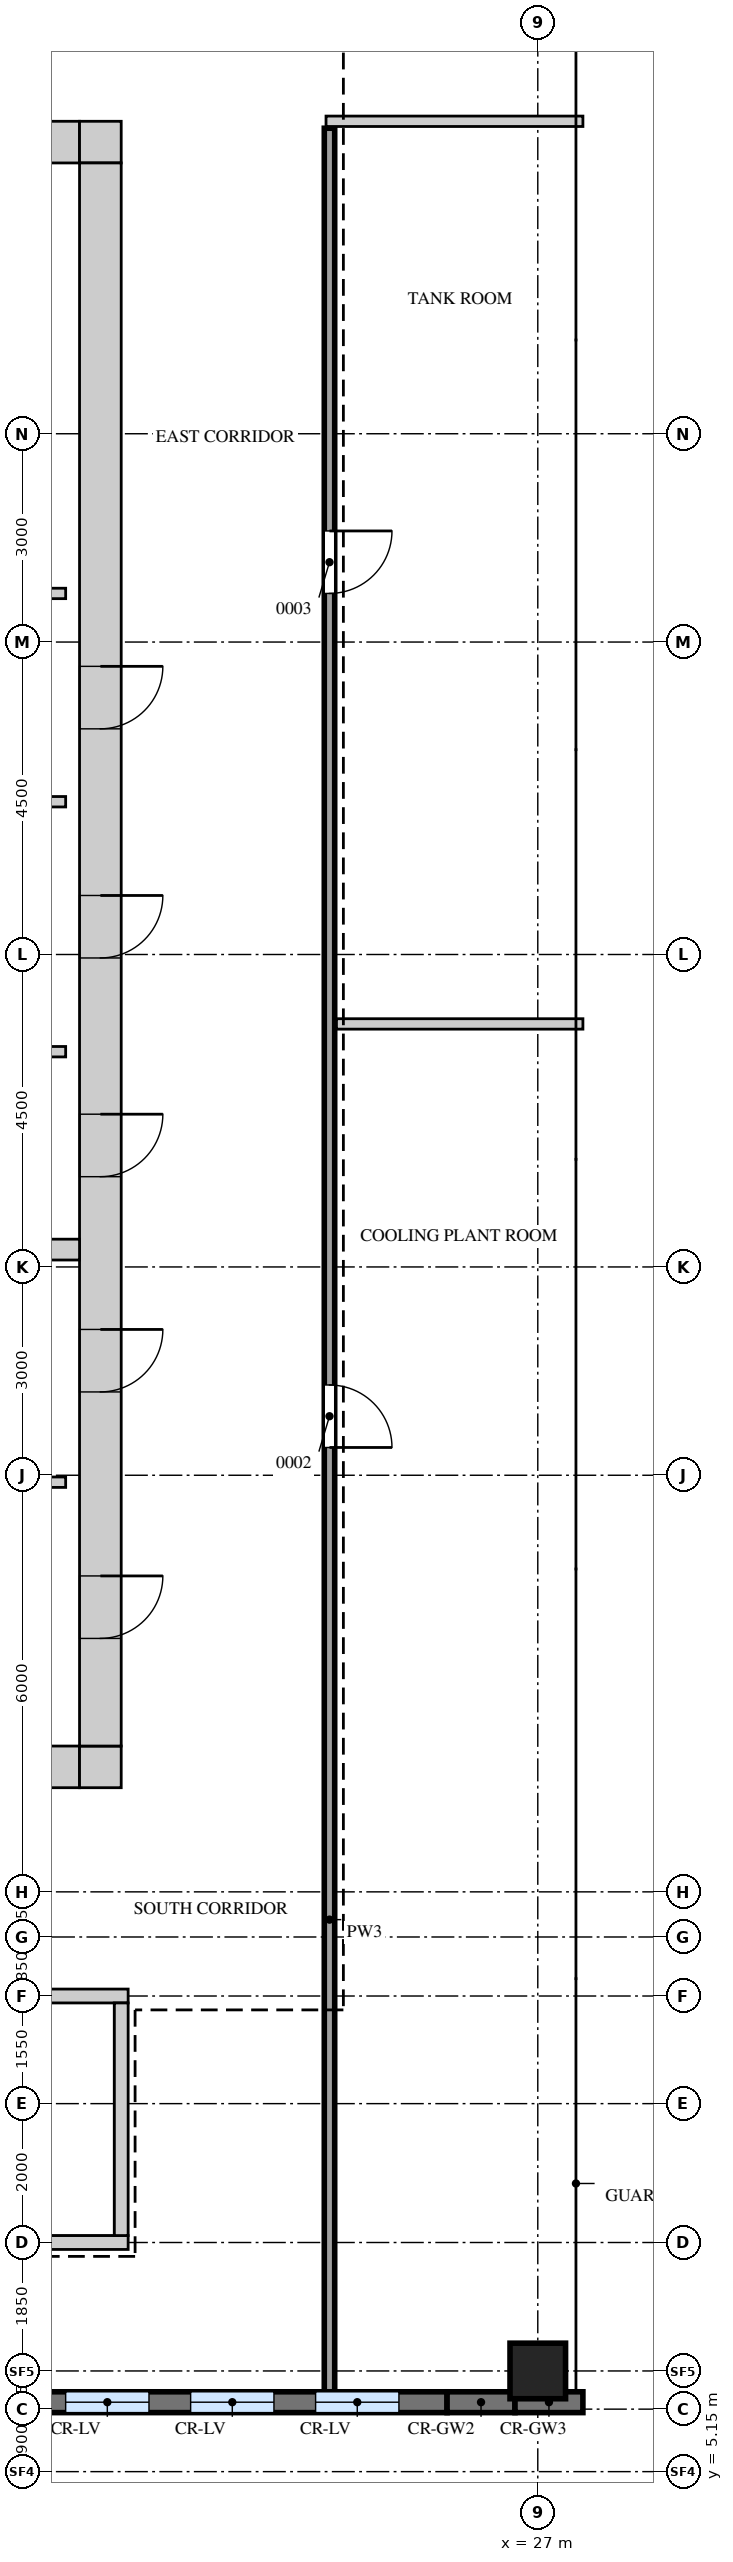
"""IFC4 building model, lengths in metres.
Left out: names, types, materials, properties, quantities, classifications, styles, units other than length and angle.
Written with IfcOpenShell. Run it as: python <this file> out.ifc"""

import sys

from ifc_helpers import new_model, si_unit, direction, frame, frame_2d, origin, origin_2d, place, context, subcontext, project, spatial, rectangle, extrude, source, transform, mapped, element, fill, save


model = new_model("IFC4")
c1 = context("Model", 3, precision=1e-05, world=origin(), true_north=direction((0.0, 1.0)))
c2 = subcontext(c1, "Body", "Model", "MODEL_VIEW")
j1 = project(units=[si_unit("LENGTHUNIT", "METRE"), si_unit("PLANEANGLEUNIT", "RADIAN")], contexts=[c1])
p1 = place(None, origin())
s1 = spatial("IfcSite", under=j1, at=p1, CompositionType="ELEMENT")
p2 = place(p1, origin())
s2 = spatial("IfcBuilding", under=s1, at=p2, CompositionType="ELEMENT")
p3 = place(p2, frame((0.0, 0.0, 348.2)))
s3 = spatial("IfcBuildingStorey", under=s2, at=p3, CompositionType="ELEMENT", Elevation=348.2)
m1 = source(origin(), c2, "Body", "SweptSolid", [
    extrude(rectangle(XDim=14.4, YDim=0.6, at=frame_2d((7.2, 0.0))), origin(), (0.0, 0.0, 1.0), 4.25),
])
p4 = place(p3, frame((6.0, 38.7, 0.0), z_axis=(0.0, 0.0, 1.0), x_axis=(1.0, 0.0, 0.0)))
e1 = element("IfcWall", 1, at=p4, inside=s3, PredefinedType="SHEAR", context=c2, shape_type="MappedRepresentation", body=[
    mapped(m1, transform((0.0, 0.0, 0.0))),
])
m2 = source(origin(), c2, "Body", "SweptSolid", [
    extrude(rectangle(XDim=0.9, YDim=2.1, at=frame_2d((0.45, 1.05))), frame((0.0, 0.31, 0.0), z_axis=(0.0, -1.0, 0.0), x_axis=(1.0, 0.0, 0.0)), (0.0, 0.0, 1.0), 0.62),
])
p5 = place(p4, frame((3.7, 0.0, 0.0)))
e2 = element("IfcOpeningElement", 2, at=p5, cuts=e1, PredefinedType="OPENING", context=c2, shape_type="MappedRepresentation", body=[
    mapped(m2, transform((0.0, 0.0, 0.0))),
])
p6 = place(p4, frame((10.4, 0.0, 0.0)))
e3 = element("IfcOpeningElement", 3, at=p6, cuts=e1, PredefinedType="OPENING", context=c2, shape_type="MappedRepresentation", body=[
    mapped(m2, transform((0.0, 0.0, 0.0))),
])
m3 = source(origin(), c2, "Body", "SweptSolid", [
    extrude(rectangle(XDim=0.6, YDim=0.6, at=frame_2d((0.3, 0.0))), origin(), (0.0, 0.0, 1.0), 4.25),
])
p7 = place(p3, frame((20.4, 38.7, 0.0), z_axis=(0.0, 0.0, 1.0), x_axis=(1.0, 0.0, 0.0)))
e4 = element("IfcWall", 4, at=p7, inside=s3, PredefinedType="SHEAR", context=c2, shape_type="MappedRepresentation", body=[
    mapped(m3, transform((0.0, 0.0, 0.0))),
])
p8 = place(p3, frame((6.0, 15.3, 0.0), z_axis=(0.0, 0.0, 1.0), x_axis=(1.0, 0.0, 0.0)))
e5 = element("IfcWall", 5, at=p8, inside=s3, PredefinedType="SHEAR", context=c2, shape_type="MappedRepresentation", body=[
    mapped(m1, transform((0.0, 0.0, 0.0))),
])
m4 = source(origin(), c2, "Body", "SweptSolid", [
    extrude(rectangle(XDim=1.2, YDim=2.1, at=frame_2d((0.6, 1.05))), frame((0.0, 0.31, 0.0), z_axis=(0.0, -1.0, 0.0), x_axis=(1.0, 0.0, 0.0)), (0.0, 0.0, 1.0), 0.62),
])
p9 = place(p8, frame((6.2, 0.0, 0.0)))
e6 = element("IfcOpeningElement", 6, at=p9, cuts=e5, PredefinedType="OPENING", context=c2, shape_type="MappedRepresentation", body=[
    mapped(m4, transform((0.0, 0.0, 0.0))),
])
p10 = place(p8, frame((2.85, 0.0, 0.0)))
e7 = element("IfcOpeningElement", 7, at=p10, cuts=e5, PredefinedType="OPENING", context=c2, shape_type="MappedRepresentation", body=[
    mapped(m4, transform((0.0, 0.0, 0.0))),
])
m5 = source(origin(), c2, "Body", "SweptSolid", [
    extrude(rectangle(XDim=1.0, YDim=2.1, at=frame_2d((0.5, 1.05))), frame((0.0, 0.31, 0.0), z_axis=(0.0, -1.0, 0.0), x_axis=(1.0, 0.0, 0.0)), (0.0, 0.0, 1.0), 0.62),
])
p11 = place(p8, frame((8.7, 0.0, 0.0)))
e8 = element("IfcOpeningElement", 8, at=p11, cuts=e5, PredefinedType="OPENING", context=c2, shape_type="MappedRepresentation", body=[
    mapped(m5, transform((0.0, 0.0, 0.0))),
])
p12 = place(p3, frame((20.4, 15.3, 0.0), z_axis=(0.0, 0.0, 1.0), x_axis=(1.0, 0.0, 0.0)))
e9 = element("IfcWall", 9, at=p12, inside=s3, PredefinedType="SHEAR", context=c2, shape_type="MappedRepresentation", body=[
    mapped(m3, transform((0.0, 0.0, 0.0))),
])
m6 = source(origin(), c2, "Body", "SweptSolid", [
    extrude(rectangle(XDim=22.8, YDim=0.6, at=frame_2d((11.4, 0.0))), origin(), (0.0, 0.0, 1.0), 4.25),
])
p13 = place(p3, frame((20.7, 15.6, 0.0), z_axis=(0.0, 0.0, 1.0), x_axis=(0.0, 1.0, 0.0)))
e10 = element("IfcWall", 10, at=p13, inside=s3, PredefinedType="SHEAR", context=c2, shape_type="MappedRepresentation", body=[
    mapped(m6, transform((0.0, 0.0, 0.0))),
])
p14 = place(p13, frame((8.2, 0.0, 0.0)))
e11 = element("IfcOpeningElement", 11, at=p14, cuts=e10, PredefinedType="OPENING", context=c2, shape_type="MappedRepresentation", body=[
    mapped(m2, transform((0.0, 0.0, 0.0))),
])
p15 = place(p13, frame((11.35, 0.0, 0.0)))
e12 = element("IfcOpeningElement", 12, at=p15, cuts=e10, PredefinedType="OPENING", context=c2, shape_type="MappedRepresentation", body=[
    mapped(m2, transform((0.0, 0.0, 0.0))),
])
p16 = place(p13, frame((14.65, 0.0, 0.0)))
e13 = element("IfcOpeningElement", 13, at=p16, cuts=e10, PredefinedType="OPENING", context=c2, shape_type="MappedRepresentation", body=[
    mapped(m2, transform((0.0, 0.0, 0.0))),
])
p17 = place(p13, frame((1.55, 0.0, 0.0)))
e14 = element("IfcOpeningElement", 14, at=p17, cuts=e10, PredefinedType="OPENING", context=c2, shape_type="MappedRepresentation", body=[
    mapped(m2, transform((0.0, 0.0, 0.0))),
])
p18 = place(p13, frame((5.1, 0.0, 0.0)))
e15 = element("IfcOpeningElement", 15, at=p18, cuts=e10, PredefinedType="OPENING", context=c2, shape_type="MappedRepresentation", body=[
    mapped(m2, transform((0.0, 0.0, 0.0))),
])
m7 = source(origin(), c2, "Body", "SweptSolid", [
    extrude(rectangle(XDim=7.2, YDim=0.2, at=frame_2d((3.6, 0.0))), origin(), (0.0, 0.0, 1.0), 4.25),
])
p19 = place(p3, frame((13.9, 12.0, 0.0), z_axis=(0.0, 0.0, 1.0), x_axis=(1.0, 0.0, 0.0)))
e16 = element("IfcWall", 16, at=p19, inside=s3, PredefinedType="SHEAR", context=c2, shape_type="MappedRepresentation", body=[
    mapped(m7, transform((0.0, 0.0, 0.0))),
])
p20 = place(p3, frame((13.9, 8.45, 0.0), z_axis=(0.0, 0.0, 1.0), x_axis=(1.0, 0.0, 0.0)))
e17 = element("IfcWall", 17, at=p20, inside=s3, PredefinedType="SHEAR", context=c2, shape_type="MappedRepresentation", body=[
    mapped(m7, transform((0.0, 0.0, 0.0))),
])
m8 = source(origin(), c2, "Body", "SweptSolid", [
    extrude(rectangle(XDim=1.2, YDim=2.1, at=frame_2d((0.6, 1.05))), frame((0.0, 0.11, 0.0), z_axis=(0.0, -1.0, 0.0), x_axis=(1.0, 0.0, 0.0)), (0.0, 0.0, 1.0), 0.22),
])
p21 = place(p20, frame((0.35, 0.0, 0.0)))
e18 = element("IfcOpeningElement", 18, at=p21, cuts=e17, PredefinedType="OPENING", context=c2, shape_type="MappedRepresentation", body=[
    mapped(m8, transform((0.0, 0.0, 0.0))),
])
m9 = source(origin(), c2, "Body", "SweptSolid", [
    extrude(rectangle(XDim=3.35, YDim=0.2, at=frame_2d((1.675, 0.0))), origin(), (0.0, 0.0, 1.0), 4.25),
])
p22 = place(p3, frame((21.0, 8.55, 0.0), z_axis=(0.0, 0.0, 1.0), x_axis=(0.0, 1.0, 0.0)))
e19 = element("IfcWall", 19, at=p22, inside=s3, PredefinedType="SHEAR", context=c2, shape_type="MappedRepresentation", body=[
    mapped(m9, transform((0.0, 0.0, 0.0))),
])
m10 = source(origin(), c2, "Body", "SweptSolid", [
    extrude(rectangle(XDim=13.2, YDim=0.3, at=frame_2d((6.6, 0.0))), origin(), (0.0, 0.0, 1.0), 4.25),
])
p23 = place(p3, frame((7.2, 22.75, 0.0), z_axis=(0.0, 0.0, 1.0), x_axis=(1.0, 0.0, 0.0)))
e20 = element("IfcWall", 20, at=p23, inside=s3, PredefinedType="STANDARD", context=c2, shape_type="MappedRepresentation", body=[
    mapped(m10, transform((0.0, 0.0, 0.0))),
])
m11 = source(origin(), c2, "Body", "SweptSolid", [
    extrude(rectangle(XDim=0.8, YDim=0.8, at=origin_2d()), origin(), (0.0, 0.0, 1.0), 1.802),
])
p24 = place(p3, frame((27.0, 6.6, 0.0), z_axis=(0.0, 0.0, 1.0), x_axis=(1.0, 0.0, 0.0)))
e21 = element("IfcColumn", 21, at=p24, inside=s3, PredefinedType="COLUMN", context=c2, shape_type="MappedRepresentation", body=[
    mapped(m11, transform((0.0, 0.0, 0.0))),
])
m12 = source(origin(), c2, "Body", "SweptSolid", [
    extrude(rectangle(XDim=13.394, YDim=0.3, at=frame_2d((6.697, 0.0))), origin(), (0.0, 0.0, 1.0), 4.5),
])
p25 = place(p3, frame((12.3, 6.15, 0.0), z_axis=(0.0, 0.0, 1.0), x_axis=(1.0, 0.0, 0.0)))
e22 = element("IfcWall", 22, at=p25, inside=s3, PredefinedType="SOLIDWALL", context=c2, shape_type="MappedRepresentation", body=[
    mapped(m12, transform((0.0, 0.0, 0.0))),
])
m13 = source(origin(), c2, "Body", "SweptSolid", [
    extrude(rectangle(XDim=1.2, YDim=2.4, at=frame_2d((0.6, 1.2))), frame((0.0, 0.16, 0.0), z_axis=(0.0, -1.0, 0.0), x_axis=(1.0, 0.0, 0.0)), (0.0, 0.0, 1.0), 0.32),
])
p26 = place(p25, frame((0.7, 0.0, 0.9)))
e23 = element("IfcOpeningElement", 23, at=p26, cuts=e22, PredefinedType="OPENING", context=c2, shape_type="MappedRepresentation", body=[
    mapped(m13, transform((0.0, 0.0, 0.0))),
])
p27 = place(p25, frame((2.5, 0.0, 0.9)))
e24 = element("IfcOpeningElement", 24, at=p27, cuts=e22, PredefinedType="OPENING", context=c2, shape_type="MappedRepresentation", body=[
    mapped(m13, transform((0.0, 0.0, 0.0))),
])
p28 = place(p25, frame((4.3, 0.0, 0.9)))
e25 = element("IfcOpeningElement", 25, at=p28, cuts=e22, PredefinedType="OPENING", context=c2, shape_type="MappedRepresentation", body=[
    mapped(m13, transform((0.0, 0.0, 0.0))),
])
p29 = place(p25, frame((6.1, 0.0, 0.9)))
e26 = element("IfcOpeningElement", 26, at=p29, cuts=e22, PredefinedType="OPENING", context=c2, shape_type="MappedRepresentation", body=[
    mapped(m13, transform((0.0, 0.0, 0.0))),
])
p30 = place(p25, frame((7.9, 0.0, 0.9)))
e27 = element("IfcOpeningElement", 27, at=p30, cuts=e22, PredefinedType="OPENING", context=c2, shape_type="MappedRepresentation", body=[
    mapped(m13, transform((0.0, 0.0, 0.0))),
])
p31 = place(p25, frame((9.7, 0.0, 0.9)))
e28 = element("IfcOpeningElement", 28, at=p31, cuts=e22, PredefinedType="OPENING", context=c2, shape_type="MappedRepresentation", body=[
    mapped(m13, transform((0.0, 0.0, 0.0))),
])
p32 = place(p25, frame((11.5, 0.0, 0.9)))
e29 = element("IfcOpeningElement", 29, at=p32, cuts=e22, PredefinedType="OPENING", context=c2, shape_type="MappedRepresentation", body=[
    mapped(m13, transform((0.0, 0.0, 0.0))),
])
m14 = source(origin(), c2, "Body", "SweptSolid", [
    extrude(rectangle(XDim=0.978, YDim=0.3, at=frame_2d((0.489, 0.0))), origin(), (0.0, 0.0, 1.0), 4.05),
])
p33 = place(p3, frame((25.694, 6.15, 0.0), z_axis=(0.0, 0.0, 1.0), x_axis=(1.0, 0.0, 0.0)))
e30 = element("IfcWall", 30, at=p33, inside=s3, PredefinedType="SOLIDWALL", context=c2, shape_type="MappedRepresentation", body=[
    mapped(m14, transform((0.0, 0.0, 0.0))),
])
m15 = source(origin(), c2, "Body", "SweptSolid", [
    extrude(rectangle(XDim=0.978, YDim=0.3, at=frame_2d((0.489, 0.0))), origin(), (0.0, 0.0, 1.0), 2.3),
])
p34 = place(p3, frame((26.672, 6.15, 0.0), z_axis=(0.0, 0.0, 1.0), x_axis=(1.0, 0.0, 0.0)))
e31 = element("IfcWall", 31, at=p34, inside=s3, PredefinedType="SOLIDWALL", context=c2, shape_type="MappedRepresentation", body=[
    mapped(m15, transform((0.0, 0.0, 0.0))),
])
m16 = source(origin(), c2, "Body", "SweptSolid", [
    extrude(rectangle(XDim=32.6, YDim=0.15, at=frame_2d((16.3, 0.0))), origin(), (0.0, 0.0, 1.0), 4.3),
])
p35 = place(p3, frame((24.0, 6.3, 0.0), z_axis=(0.0, 0.0, 1.0), x_axis=(0.0, 1.0, 0.0)))
e32 = element("IfcWall", 32, at=p35, inside=s3, PredefinedType="PARTITIONING", context=c2, shape_type="MappedRepresentation", body=[
    mapped(m16, transform((0.0, 0.0, 0.0))),
])
m17 = source(origin(), c2, "Body", "SweptSolid", [
    extrude(rectangle(XDim=0.9, YDim=2.1, at=frame_2d((0.45, 1.05))), frame((0.0, 0.085, 0.0), z_axis=(0.0, -1.0, 0.0), x_axis=(1.0, 0.0, 0.0)), (0.0, 0.0, 1.0), 0.17),
])
p36 = place(p35, frame((13.6, 0.0, 0.0)))
e33 = element("IfcOpeningElement", 33, at=p36, cuts=e32, PredefinedType="OPENING", context=c2, shape_type="MappedRepresentation", body=[
    mapped(m17, transform((0.0, 0.0, 0.0))),
])
p37 = place(p35, frame((25.9, 0.0, 0.0)))
e34 = element("IfcOpeningElement", 34, at=p37, cuts=e32, PredefinedType="OPENING", context=c2, shape_type="MappedRepresentation", body=[
    mapped(m17, transform((0.0, 0.0, 0.0))),
])
m18 = source(origin(), c2, "Body", "SweptSolid", [
    extrude(rectangle(XDim=4.1, YDim=0.15, at=frame_2d((2.05, 0.0))), origin(), (0.0, 0.0, 1.0), 4.3),
])
p38 = place(p3, frame((16.1, 19.4, 0.0), z_axis=(0.0, 0.0, 1.0), x_axis=(1.0, 0.0, 0.0)))
e35 = element("IfcWall", 35, at=p38, inside=s3, PredefinedType="PARTITIONING", context=c2, shape_type="MappedRepresentation", body=[
    mapped(m18, transform((0.0, 0.0, 0.0))),
])
m19 = source(origin(), c2, "Body", "SweptSolid", [
    extrude(rectangle(XDim=13.4, YDim=0.15, at=frame_2d((6.7, 0.0))), origin(), (0.0, 0.0, 1.0), 4.3),
])
p39 = place(p3, frame((6.8, 25.6, 0.0), z_axis=(0.0, 0.0, 1.0), x_axis=(1.0, 0.0, 0.0)))
e36 = element("IfcWall", 36, at=p39, inside=s3, PredefinedType="PARTITIONING", context=c2, shape_type="MappedRepresentation", body=[
    mapped(m19, transform((0.0, 0.0, 0.0))),
])
m20 = source(origin(), c2, "Body", "SweptSolid", [
    extrude(rectangle(XDim=3.55, YDim=0.15, at=frame_2d((1.775, 0.0))), origin(), (0.0, 0.0, 1.0), 4.3),
])
p40 = place(p3, frame((24.1, 26.0, 0.0), z_axis=(0.0, 0.0, 1.0), x_axis=(1.0, 0.0, 0.0)))
e37 = element("IfcWall", 37, at=p40, inside=s3, PredefinedType="PARTITIONING", context=c2, shape_type="MappedRepresentation", body=[
    mapped(m20, transform((0.0, 0.0, 0.0))),
])
for number, where, z_axis, x_axis in (
    (38, (6.8, 29.2, 0.0), (0.0, 0.0, 1.0), (1.0, 0.0, 0.0)),
    (39, (6.8, 32.2, 0.0), (0.0, 0.0, 1.0), (1.0, 0.0, 0.0)),
):
    element("IfcWall", number, at=place(p3, frame(where, z_axis=z_axis, x_axis=x_axis)), inside=s3, PredefinedType="PARTITIONING", context=c2, shape_type="MappedRepresentation", body=[
        mapped(m19, transform((0.0, 0.0, 0.0))),
    ])
m21 = source(origin(), c2, "Body", "SweptSolid", [
    extrude(rectangle(XDim=3.7, YDim=0.15, at=frame_2d((1.85, 0.0))), origin(), (0.0, 0.0, 1.0), 4.3),
])
p41 = place(p3, frame((23.95, 39.0, 0.0), z_axis=(0.0, 0.0, 1.0), x_axis=(1.0, 0.0, 0.0)))
e40 = element("IfcWall", 40, at=p41, inside=s3, PredefinedType="PARTITIONING", context=c2, shape_type="MappedRepresentation", body=[
    mapped(m21, transform((0.0, 0.0, 0.0))),
])
m22 = source(origin(), c2, "Body", "SweptSolid", [
    extrude(rectangle(XDim=1.2, YDim=2.4, at=frame_2d((0.6, 1.2))), frame((0.0, 0.03, 0.0), z_axis=(0.0, -1.0, 0.0), x_axis=(1.0, 0.0, 0.0)), (0.0, 0.0, 1.0), 0.06),
])
p42 = place(p30, origin())
e41 = element("IfcWindow", 41, at=p42, inside=s3, PartitioningType="SINGLE_PANEL", PredefinedType="WINDOW", context=c2, shape_type="MappedRepresentation", body=[
    mapped(m22, transform((0.0, 0.0, 0.0))),
])
fill(e27, e41)
p43 = place(p31, origin())
e42 = element("IfcWindow", 42, at=p43, inside=s3, PartitioningType="SINGLE_PANEL", PredefinedType="WINDOW", context=c2, shape_type="MappedRepresentation", body=[
    mapped(m22, transform((0.0, 0.0, 0.0))),
])
fill(e28, e42)
p44 = place(p32, origin())
e43 = element("IfcWindow", 43, at=p44, inside=s3, PartitioningType="SINGLE_PANEL", PredefinedType="WINDOW", context=c2, shape_type="MappedRepresentation", body=[
    mapped(m22, transform((0.0, 0.0, 0.0))),
])
fill(e29, e43)
m23 = source(origin(), c2, "Body", "SweptSolid", [
    extrude(rectangle(XDim=0.9, YDim=2.1, at=frame_2d((0.45, 1.05))), frame((0.0, 0.25, 0.0), z_axis=(0.0, -1.0, 0.0), x_axis=(1.0, 0.0, 0.0)), (0.0, 0.0, 1.0), 0.5),
])
p45 = place(p14, origin())
e44 = element("IfcDoor", 44, at=p45, inside=s3, OperationType="SINGLE_SWING_RIGHT", PredefinedType="DOOR", context=c2, shape_type="MappedRepresentation", body=[
    mapped(m23, transform((0.0, 0.0, 0.0))),
])
fill(e11, e44)
p46 = place(p15, origin())
e45 = element("IfcDoor", 45, at=p46, inside=s3, OperationType="SINGLE_SWING_RIGHT", PredefinedType="DOOR", context=c2, shape_type="MappedRepresentation", body=[
    mapped(m23, transform((0.0, 0.0, 0.0))),
])
fill(e12, e45)
p47 = place(p16, origin())
e46 = element("IfcDoor", 46, at=p47, inside=s3, OperationType="SINGLE_SWING_RIGHT", PredefinedType="DOOR", context=c2, shape_type="MappedRepresentation", body=[
    mapped(m23, transform((0.0, 0.0, 0.0))),
])
fill(e13, e46)
m24 = source(origin(), c2, "Body", "SweptSolid", [
    extrude(rectangle(XDim=0.9, YDim=2.1, at=frame_2d((0.45, 1.05))), frame((0.0, 0.025, 0.0), z_axis=(0.0, -1.0, 0.0), x_axis=(1.0, 0.0, 0.0)), (0.0, 0.0, 1.0), 0.05),
])
p48 = place(p36, origin())
e47 = element("IfcDoor", 47, at=p48, inside=s3, OperationType="SINGLE_SWING_LEFT", PredefinedType="DOOR", context=c2, shape_type="MappedRepresentation", body=[
    mapped(m24, transform((0.0, 0.0, 0.0))),
])
fill(e33, e47)
p49 = place(p37, origin())
e48 = element("IfcDoor", 48, at=p49, inside=s3, OperationType="SINGLE_SWING_RIGHT", PredefinedType="DOOR", context=c2, shape_type="MappedRepresentation", body=[
    mapped(m24, transform((0.0, 0.0, 0.0))),
])
fill(e34, e48)
p50 = place(p17, origin())
e49 = element("IfcDoor", 49, at=p50, inside=s3, OperationType="SINGLE_SWING_RIGHT", PredefinedType="DOOR", context=c2, shape_type="MappedRepresentation", body=[
    mapped(m23, transform((0.0, 0.0, 0.0))),
])
fill(e14, e49)
p51 = place(p18, origin())
e50 = element("IfcDoor", 50, at=p51, inside=s3, OperationType="SINGLE_SWING_RIGHT", PredefinedType="DOOR", context=c2, shape_type="MappedRepresentation", body=[
    mapped(m23, transform((0.0, 0.0, 0.0))),
])
fill(e15, e50)
save(model, sys.argv[1])
